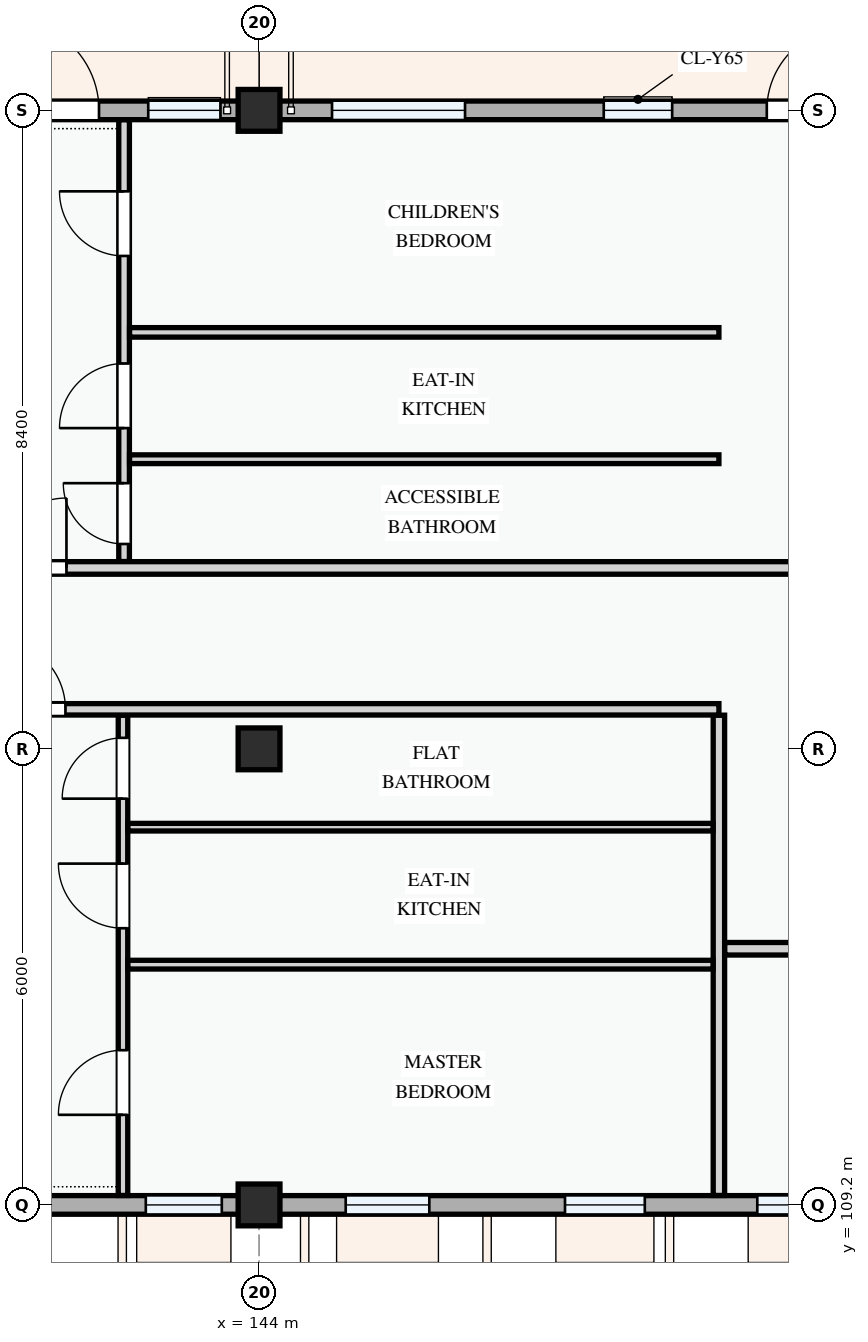
"""IFC4 building model, lengths in metres.
Left out: names, types, materials, properties, quantities, classifications, styles, units other than length and angle.
Written with IfcOpenShell. Run it as: python <this file> out.ifc"""

import sys

from ifc_helpers import new_model, si_unit, direction, frame, frame_2d, origin, origin_2d, place, context, subcontext, project, spatial, rectangle, extrude, element, fill, save


model = new_model("IFC4")
c1 = context("Model", 3, precision=1e-05, world=origin(), true_north=direction((0.0, 1.0)))
c2 = subcontext(c1, "Body", "Model", "MODEL_VIEW")
j1 = project(units=[si_unit("LENGTHUNIT", "METRE"), si_unit("PLANEANGLEUNIT", "RADIAN")], contexts=[c1])
p1 = place(None, origin())
s1 = spatial("IfcSite", under=j1, at=p1, CompositionType="ELEMENT")
p2 = place(p1, origin())
s2 = spatial("IfcBuilding", under=s1, at=p2, CompositionType="ELEMENT")
p3 = place(p2, frame((0.0, 0.0, 37.8)))
s3 = spatial("IfcBuildingStorey", under=s2, at=p3, CompositionType="ELEMENT", Elevation=37.8)
for number, where, z_axis, x_axis in (
    (1, (144.0, 109.2, 0.0), (0.0, 0.0, 1.0), (1.0, 0.0, 0.0)),
    (2, (144.0, 115.2, 0.0), (0.0, 0.0, 1.0), (1.0, 0.0, 0.0)),
    (3, (144.0, 123.6, 0.0), (0.0, 0.0, 1.0), (1.0, 0.0, 0.0)),
):
    element("IfcColumn", number, at=place(p3, frame(where, z_axis=z_axis, x_axis=x_axis)), inside=s3, PredefinedType="COLUMN", context=c2, shape_type="SweptSolid", body=[
        extrude(rectangle(XDim=0.55, YDim=0.55, at=origin_2d()), origin(), (0.0, 0.0, 1.0), 3.3),
    ])
p4 = place(p3, frame((152.4, 123.6, 0.0), z_axis=(0.0, 0.0, 1.0), x_axis=(-1.0, 0.0, 0.0)))
e4 = element("IfcWall", 4, at=p4, inside=s3, PredefinedType="STANDARD", context=c2, shape_type="SweptSolid", body=[
    extrude(rectangle(XDim=8.4, YDim=0.245, at=frame_2d((4.2, 0.0))), origin(), (0.0, 0.0, 1.0), 2.375),
])
p5 = place(p4, frame((0.62, 0.0, 0.0)))
e5 = element("IfcOpeningElement", 5, at=p5, cuts=e4, PredefinedType="OPENING", context=c2, shape_type="SweptSolid", body=[
    extrude(rectangle(XDim=1.1, YDim=2.15, at=frame_2d((0.55, 1.075))), frame((0.0, 0.133, 0.0), z_axis=(0.0, -1.0, 0.0), x_axis=(1.0, 0.0, 0.0)), (0.0, 0.0, 1.0), 0.265),
])
p6 = place(p4, frame((2.965, 0.0, 0.78)))
e6 = element("IfcOpeningElement", 6, at=p6, cuts=e4, PredefinedType="OPENING", context=c2, shape_type="SweptSolid", body=[
    extrude(rectangle(XDim=0.9, YDim=1.2, at=frame_2d((0.45, 0.6))), frame((0.0, 0.133, 0.0), z_axis=(0.0, -1.0, 0.0), x_axis=(1.0, 0.0, 0.0)), (0.0, 0.0, 1.0), 0.265),
])
p7 = place(p4, frame((5.69, 0.0, 0.78)))
e7 = element("IfcOpeningElement", 7, at=p7, cuts=e4, PredefinedType="OPENING", context=c2, shape_type="SweptSolid", body=[
    extrude(rectangle(XDim=1.75, YDim=1.45, at=frame_2d((0.875, 0.725))), frame((0.0, 0.133, 0.0), z_axis=(0.0, -1.0, 0.0), x_axis=(1.0, 0.0, 0.0)), (0.0, 0.0, 1.0), 0.265),
])
p8 = place(p3, frame((144.0, 123.6, 0.0), z_axis=(0.0, 0.0, 1.0), x_axis=(-1.0, 0.0, 0.0)))
e8 = element("IfcWall", 8, at=p8, inside=s3, PredefinedType="STANDARD", context=c2, shape_type="SweptSolid", body=[
    extrude(rectangle(XDim=6.0, YDim=0.245, at=frame_2d((3.0, 0.0))), origin(), (0.0, 0.0, 1.0), 2.525),
])
p9 = place(p8, frame((2.106, 0.0, 0.0)))
e9 = element("IfcOpeningElement", 9, at=p9, cuts=e8, PredefinedType="OPENING", context=c2, shape_type="SweptSolid", body=[
    extrude(rectangle(XDim=1.2, YDim=2.15, at=frame_2d((0.6, 1.075))), frame((0.0, 0.133, 0.0), z_axis=(0.0, -1.0, 0.0), x_axis=(1.0, 0.0, 0.0)), (0.0, 0.0, 1.0), 0.265),
])
p10 = place(p8, frame((0.508, 0.0, 0.78)))
e10 = element("IfcOpeningElement", 10, at=p10, cuts=e8, PredefinedType="OPENING", context=c2, shape_type="SweptSolid", body=[
    extrude(rectangle(XDim=0.95, YDim=1.15, at=frame_2d((0.475, 0.575))), frame((0.0, 0.133, 0.0), z_axis=(0.0, -1.0, 0.0), x_axis=(1.0, 0.0, 0.0)), (0.0, 0.0, 1.0), 0.265),
])
p11 = place(p8, frame((3.643, 0.0, 0.78)))
e11 = element("IfcOpeningElement", 11, at=p11, cuts=e8, PredefinedType="OPENING", context=c2, shape_type="SweptSolid", body=[
    extrude(rectangle(XDim=1.88, YDim=1.52, at=frame_2d((0.94, 0.76))), frame((0.0, 0.133, 0.0), z_axis=(0.0, -1.0, 0.0), x_axis=(1.0, 0.0, 0.0)), (0.0, 0.0, 1.0), 0.265),
])
p12 = place(p3, frame((138.0, 109.2, 0.0), z_axis=(0.0, 0.0, 1.0), x_axis=(1.0, 0.0, 0.0)))
e12 = element("IfcWall", 12, at=p12, inside=s3, PredefinedType="STANDARD", context=c2, shape_type="SweptSolid", body=[
    extrude(rectangle(XDim=6.0, YDim=0.245, at=frame_2d((3.0, 0.0))), origin(), (0.0, 0.0, 1.0), 2.525),
])
p13 = place(p12, frame((1.7, 0.0, 0.78)))
e13 = element("IfcOpeningElement", 13, at=p13, cuts=e12, PredefinedType="OPENING", context=c2, shape_type="SweptSolid", body=[
    extrude(rectangle(XDim=1.0, YDim=1.25, at=frame_2d((0.5, 0.625))), frame((0.0, 0.133, 0.0), z_axis=(0.0, -1.0, 0.0), x_axis=(1.0, 0.0, 0.0)), (0.0, 0.0, 1.0), 0.265),
])
p14 = place(p12, frame((4.51, 0.0, 0.78)))
e14 = element("IfcOpeningElement", 14, at=p14, cuts=e12, PredefinedType="OPENING", context=c2, shape_type="SweptSolid", body=[
    extrude(rectangle(XDim=1.0, YDim=1.25, at=frame_2d((0.5, 0.625))), frame((0.0, 0.133, 0.0), z_axis=(0.0, -1.0, 0.0), x_axis=(1.0, 0.0, 0.0)), (0.0, 0.0, 1.0), 0.265),
])
p15 = place(p3, frame((144.0, 109.2, 0.0), z_axis=(0.0, 0.0, 1.0), x_axis=(1.0, 0.0, 0.0)))
e15 = element("IfcWall", 15, at=p15, inside=s3, PredefinedType="STANDARD", context=c2, shape_type="SweptSolid", body=[
    extrude(rectangle(XDim=8.4, YDim=0.245, at=frame_2d((4.2, 0.0))), origin(), (0.0, 0.0, 1.0), 2.375),
])
p16 = place(p15, frame((1.14, 0.0, 0.78)))
e16 = element("IfcOpeningElement", 16, at=p16, cuts=e15, PredefinedType="OPENING", context=c2, shape_type="SweptSolid", body=[
    extrude(rectangle(XDim=1.1, YDim=1.3, at=frame_2d((0.55, 0.65))), frame((0.0, 0.133, 0.0), z_axis=(0.0, -1.0, 0.0), x_axis=(1.0, 0.0, 0.0)), (0.0, 0.0, 1.0), 0.265),
])
p17 = place(p15, frame((4.025, 0.0, 0.78)))
e17 = element("IfcOpeningElement", 17, at=p17, cuts=e15, PredefinedType="OPENING", context=c2, shape_type="SweptSolid", body=[
    extrude(rectangle(XDim=1.05, YDim=1.2, at=frame_2d((0.525, 0.6))), frame((0.0, 0.133, 0.0), z_axis=(0.0, -1.0, 0.0), x_axis=(1.0, 0.0, 0.0)), (0.0, 0.0, 1.0), 0.265),
])
p18 = place(p15, frame((6.555, 0.0, 0.78)))
e18 = element("IfcOpeningElement", 18, at=p18, cuts=e15, PredefinedType="OPENING", context=c2, shape_type="SweptSolid", body=[
    extrude(rectangle(XDim=1.15, YDim=1.25, at=frame_2d((0.575, 0.625))), frame((0.0, 0.133, 0.0), z_axis=(0.0, -1.0, 0.0), x_axis=(1.0, 0.0, 0.0)), (0.0, 0.0, 1.0), 0.265),
])
p19 = place(p3, frame((150.05, 109.324, 0.0), z_axis=(0.0, 0.0, 1.0), x_axis=(0.0, 1.0, 0.0)))
e19 = element("IfcWall", 19, at=p19, inside=s3, PredefinedType="PARTITIONING", context=c2, shape_type="SweptSolid", body=[
    extrude(rectangle(XDim=6.319, YDim=0.15, at=frame_2d((3.159, 0.0))), origin(), (0.0, 0.0, 1.0), 3.0),
])
p20 = place(p3, frame((150.127, 112.57, 0.0), z_axis=(0.0, 0.0, 1.0), x_axis=(1.0, 0.0, 0.0)))
e20 = element("IfcWall", 20, at=p20, inside=s3, PredefinedType="PARTITIONING", context=c2, shape_type="SweptSolid", body=[
    extrude(rectangle(XDim=2.413, YDim=0.165, at=frame_2d((1.207, 0.0))), origin(), (0.0, 0.0, 1.0), 3.0),
])
p21 = place(p3, frame((142.21, 109.324, 0.0), z_axis=(0.0, 0.0, 1.0), x_axis=(0.0, 1.0, 0.0)))
e21 = element("IfcWall", 21, at=p21, inside=s3, PredefinedType="PARTITIONING", context=c2, shape_type="SweptSolid", body=[
    extrude(rectangle(XDim=6.319, YDim=0.125, at=frame_2d((3.159, 0.0))), origin(), (0.0, 0.0, 1.0), 3.0),
])
p22 = place(p21, frame((1.061, 0.0, 0.0)))
e22 = element("IfcOpeningElement", 22, at=p22, cuts=e21, PredefinedType="OPENING", context=c2, shape_type="SweptSolid", body=[
    extrude(rectangle(XDim=0.85, YDim=2.1, at=frame_2d((0.425, 1.05))), frame((0.0, 0.073, 0.0), z_axis=(0.0, -1.0, 0.0), x_axis=(1.0, 0.0, 0.0)), (0.0, 0.0, 1.0), 0.145),
])
p23 = place(p21, frame((3.516, 0.0, 0.0)))
e23 = element("IfcOpeningElement", 23, at=p23, cuts=e21, PredefinedType="OPENING", context=c2, shape_type="SweptSolid", body=[
    extrude(rectangle(XDim=0.85, YDim=2.1, at=frame_2d((0.425, 1.05))), frame((0.0, 0.073, 0.0), z_axis=(0.0, -1.0, 0.0), x_axis=(1.0, 0.0, 0.0)), (0.0, 0.0, 1.0), 0.145),
])
p24 = place(p21, frame((5.22, 0.0, 0.0)))
e24 = element("IfcOpeningElement", 24, at=p24, cuts=e21, PredefinedType="OPENING", context=c2, shape_type="SweptSolid", body=[
    extrude(rectangle(XDim=0.8, YDim=2.1, at=frame_2d((0.4, 1.05))), frame((0.0, 0.073, 0.0), z_axis=(0.0, -1.0, 0.0), x_axis=(1.0, 0.0, 0.0)), (0.0, 0.0, 1.0), 0.145),
])
p25 = place(p3, frame((142.274, 112.361, 0.0), z_axis=(0.0, 0.0, 1.0), x_axis=(1.0, 0.0, 0.0)))
e25 = element("IfcWall", 25, at=p25, inside=s3, PredefinedType="PARTITIONING", context=c2, shape_type="SweptSolid", body=[
    extrude(rectangle(XDim=7.698, YDim=0.115, at=frame_2d((3.849, 0.0))), origin(), (0.0, 0.0, 1.0), 3.0),
])
p26 = place(p3, frame((142.274, 114.17, 0.0), z_axis=(0.0, 0.0, 1.0), x_axis=(1.0, 0.0, 0.0)))
e26 = element("IfcWall", 26, at=p26, inside=s3, PredefinedType="PARTITIONING", context=c2, shape_type="SweptSolid", body=[
    extrude(rectangle(XDim=7.698, YDim=0.1, at=frame_2d((3.849, 0.0))), origin(), (0.0, 0.0, 1.0), 3.0),
])
p27 = place(p3, frame((142.224, 117.665, 0.0), z_axis=(0.0, 0.0, 1.0), x_axis=(0.0, 1.0, 0.0)))
e27 = element("IfcWall", 27, at=p27, inside=s3, PredefinedType="PARTITIONING", context=c2, shape_type="SweptSolid", body=[
    extrude(rectangle(XDim=5.811, YDim=0.14, at=frame_2d((2.906, 0.0))), origin(), (0.0, 0.0, 1.0), 3.0),
])
p28 = place(p27, frame((0.231, 0.0, 0.0)))
e28 = element("IfcOpeningElement", 28, at=p28, cuts=e27, PredefinedType="OPENING", context=c2, shape_type="SweptSolid", body=[
    extrude(rectangle(XDim=0.8, YDim=2.1, at=frame_2d((0.4, 1.05))), frame((0.0, 0.08, 0.0), z_axis=(0.0, -1.0, 0.0), x_axis=(1.0, 0.0, 0.0)), (0.0, 0.0, 1.0), 0.16),
])
p29 = place(p27, frame((1.755, 0.0, 0.0)))
e29 = element("IfcOpeningElement", 29, at=p29, cuts=e27, PredefinedType="OPENING", context=c2, shape_type="SweptSolid", body=[
    extrude(rectangle(XDim=0.85, YDim=2.1, at=frame_2d((0.425, 1.05))), frame((0.0, 0.08, 0.0), z_axis=(0.0, -1.0, 0.0), x_axis=(1.0, 0.0, 0.0)), (0.0, 0.0, 1.0), 0.16),
])
p30 = place(p27, frame((4.02, 0.0, 0.0)))
e30 = element("IfcOpeningElement", 30, at=p30, cuts=e27, PredefinedType="OPENING", context=c2, shape_type="SweptSolid", body=[
    extrude(rectangle(XDim=0.85, YDim=2.1, at=frame_2d((0.425, 1.05))), frame((0.0, 0.08, 0.0), z_axis=(0.0, -1.0, 0.0), x_axis=(1.0, 0.0, 0.0)), (0.0, 0.0, 1.0), 0.16),
])
p31 = place(p3, frame((142.296, 120.679, 0.0), z_axis=(0.0, 0.0, 1.0), x_axis=(1.0, 0.0, 0.0)))
e31 = element("IfcWall", 31, at=p31, inside=s3, PredefinedType="PARTITIONING", context=c2, shape_type="SweptSolid", body=[
    extrude(rectangle(XDim=7.754, YDim=0.125, at=frame_2d((3.877, 0.0))), origin(), (0.0, 0.0, 1.0), 3.0),
])
p32 = place(p3, frame((142.296, 119.01, 0.0), z_axis=(0.0, 0.0, 1.0), x_axis=(1.0, 0.0, 0.0)))
e32 = element("IfcWall", 32, at=p32, inside=s3, PredefinedType="PARTITIONING", context=c2, shape_type="SweptSolid", body=[
    extrude(rectangle(XDim=7.754, YDim=0.115, at=frame_2d((3.877, 0.0))), origin(), (0.0, 0.0, 1.0), 3.0),
])
p33 = place(p3, frame((109.324, 115.72, 0.0), z_axis=(0.0, 0.0, 1.0), x_axis=(1.0, 0.0, 0.0)))
e33 = element("IfcWall", 33, at=p33, inside=s3, PredefinedType="PARTITIONING", context=c2, shape_type="SweptSolid", body=[
    extrude(rectangle(XDim=40.726, YDim=0.15, at=frame_2d((20.363, 0.0))), origin(), (0.0, 0.0, 1.0), 3.0),
])
p34 = place(p33, frame((2.322, 0.0, 0.0)))
e34 = element("IfcOpeningElement", 34, at=p34, cuts=e33, PredefinedType="OPENING", context=c2, shape_type="SweptSolid", body=[
    extrude(rectangle(XDim=0.92, YDim=2.1, at=frame_2d((0.46, 1.05))), frame((0.0, 0.085, 0.0), z_axis=(0.0, -1.0, 0.0), x_axis=(1.0, 0.0, 0.0)), (0.0, 0.0, 1.0), 0.17),
])
p35 = place(p33, frame((16.832, 0.0, 0.0)))
e35 = element("IfcOpeningElement", 35, at=p35, cuts=e33, PredefinedType="OPENING", context=c2, shape_type="SweptSolid", body=[
    extrude(rectangle(XDim=0.92, YDim=2.1, at=frame_2d((0.46, 1.05))), frame((0.0, 0.085, 0.0), z_axis=(0.0, -1.0, 0.0), x_axis=(1.0, 0.0, 0.0)), (0.0, 0.0, 1.0), 0.17),
])
p36 = place(p33, frame((31.208, 0.0, 0.0)))
e36 = element("IfcOpeningElement", 36, at=p36, cuts=e33, PredefinedType="OPENING", context=c2, shape_type="SweptSolid", body=[
    extrude(rectangle(XDim=0.92, YDim=2.1, at=frame_2d((0.46, 1.05))), frame((0.0, 0.085, 0.0), z_axis=(0.0, -1.0, 0.0), x_axis=(1.0, 0.0, 0.0)), (0.0, 0.0, 1.0), 0.17),
])
p37 = place(p3, frame((109.324, 117.58, 0.0), z_axis=(0.0, 0.0, 1.0), x_axis=(1.0, 0.0, 0.0)))
e37 = element("IfcWall", 37, at=p37, inside=s3, PredefinedType="PARTITIONING", context=c2, shape_type="SweptSolid", body=[
    extrude(rectangle(XDim=43.216, YDim=0.165, at=frame_2d((21.608, 0.0))), origin(), (0.0, 0.0, 1.0), 3.0),
])
p38 = place(p37, frame((2.339, 0.0, 0.0)))
e38 = element("IfcOpeningElement", 38, at=p38, cuts=e37, PredefinedType="OPENING", context=c2, shape_type="SweptSolid", body=[
    extrude(rectangle(XDim=0.92, YDim=2.1, at=frame_2d((0.46, 1.05))), frame((0.0, 0.093, 0.0), z_axis=(0.0, -1.0, 0.0), x_axis=(1.0, 0.0, 0.0)), (0.0, 0.0, 1.0), 0.185),
])
p39 = place(p37, frame((16.851, 0.0, 0.0)))
e39 = element("IfcOpeningElement", 39, at=p39, cuts=e37, PredefinedType="OPENING", context=c2, shape_type="SweptSolid", body=[
    extrude(rectangle(XDim=0.96, YDim=2.12, at=frame_2d((0.48, 1.06))), frame((0.0, 0.093, 0.0), z_axis=(0.0, -1.0, 0.0), x_axis=(1.0, 0.0, 0.0)), (0.0, 0.0, 1.0), 0.185),
])
p40 = place(p37, frame((31.222, 0.0, 0.0)))
e40 = element("IfcOpeningElement", 40, at=p40, cuts=e37, PredefinedType="OPENING", context=c2, shape_type="SweptSolid", body=[
    extrude(rectangle(XDim=0.92, YDim=2.1, at=frame_2d((0.46, 1.05))), frame((0.0, 0.093, 0.0), z_axis=(0.0, -1.0, 0.0), x_axis=(1.0, 0.0, 0.0)), (0.0, 0.0, 1.0), 0.185),
])
p41 = place(p5, frame((1.1, 0.0, 0.0), z_axis=(0.0, 0.0, 1.0), x_axis=(-1.0, 0.0, 0.0)))
e41 = element("IfcDoor", 41, at=p41, inside=s3, OperationType="SINGLE_SWING_RIGHT", PredefinedType="DOOR", context=c2, shape_type="SweptSolid", body=[
    extrude(rectangle(XDim=1.1, YDim=2.15, at=frame_2d((0.55, 1.075))), frame((0.0, 0.025, 0.0), z_axis=(0.0, -1.0, 0.0), x_axis=(1.0, 0.0, 0.0)), (0.0, 0.0, 1.0), 0.05),
])
fill(e5, e41)
p42 = place(p6, origin())
e42 = element("IfcWindow", 42, at=p42, inside=s3, PartitioningType="SINGLE_PANEL", PredefinedType="WINDOW", context=c2, shape_type="SweptSolid", body=[
    extrude(rectangle(XDim=0.9, YDim=1.2, at=frame_2d((0.45, 0.6))), frame((0.0, 0.03, 0.0), z_axis=(0.0, -1.0, 0.0), x_axis=(1.0, 0.0, 0.0)), (0.0, 0.0, 1.0), 0.06),
])
fill(e6, e42)
p43 = place(p7, origin())
e43 = element("IfcWindow", 43, at=p43, inside=s3, PartitioningType="DOUBLE_PANEL_VERTICAL", PredefinedType="WINDOW", context=c2, shape_type="SweptSolid", body=[
    extrude(rectangle(XDim=1.75, YDim=1.45, at=frame_2d((0.875, 0.725))), frame((0.0, 0.03, 0.0), z_axis=(0.0, -1.0, 0.0), x_axis=(1.0, 0.0, 0.0)), (0.0, 0.0, 1.0), 0.06),
])
fill(e7, e43)
p44 = place(p9, frame((1.2, 0.0, 0.0), z_axis=(0.0, 0.0, 1.0), x_axis=(-1.0, 0.0, 0.0)))
e44 = element("IfcDoor", 44, at=p44, inside=s3, OperationType="SINGLE_SWING_LEFT", PredefinedType="DOOR", context=c2, shape_type="SweptSolid", body=[
    extrude(rectangle(XDim=1.2, YDim=2.15, at=frame_2d((0.6, 1.075))), frame((0.0, 0.025, 0.0), z_axis=(0.0, -1.0, 0.0), x_axis=(1.0, 0.0, 0.0)), (0.0, 0.0, 1.0), 0.05),
])
fill(e9, e44)
p45 = place(p10, origin())
e45 = element("IfcWindow", 45, at=p45, inside=s3, PartitioningType="SINGLE_PANEL", PredefinedType="WINDOW", context=c2, shape_type="SweptSolid", body=[
    extrude(rectangle(XDim=0.95, YDim=1.15, at=frame_2d((0.475, 0.575))), frame((0.0, 0.03, 0.0), z_axis=(0.0, -1.0, 0.0), x_axis=(1.0, 0.0, 0.0)), (0.0, 0.0, 1.0), 0.06),
])
fill(e10, e45)
p46 = place(p14, origin())
e46 = element("IfcWindow", 46, at=p46, inside=s3, PartitioningType="SINGLE_PANEL", PredefinedType="WINDOW", context=c2, shape_type="SweptSolid", body=[
    extrude(rectangle(XDim=1.0, YDim=1.25, at=frame_2d((0.5, 0.625))), frame((0.0, 0.03, 0.0), z_axis=(0.0, -1.0, 0.0), x_axis=(1.0, 0.0, 0.0)), (0.0, 0.0, 1.0), 0.06),
])
fill(e14, e46)
p47 = place(p16, origin())
e47 = element("IfcWindow", 47, at=p47, inside=s3, PartitioningType="SINGLE_PANEL", PredefinedType="WINDOW", context=c2, shape_type="SweptSolid", body=[
    extrude(rectangle(XDim=1.1, YDim=1.3, at=frame_2d((0.55, 0.65))), frame((0.0, 0.03, 0.0), z_axis=(0.0, -1.0, 0.0), x_axis=(1.0, 0.0, 0.0)), (0.0, 0.0, 1.0), 0.06),
])
fill(e16, e47)
p48 = place(p17, origin())
e48 = element("IfcWindow", 48, at=p48, inside=s3, PartitioningType="SINGLE_PANEL", PredefinedType="WINDOW", context=c2, shape_type="SweptSolid", body=[
    extrude(rectangle(XDim=1.05, YDim=1.2, at=frame_2d((0.525, 0.6))), frame((0.0, 0.03, 0.0), z_axis=(0.0, -1.0, 0.0), x_axis=(1.0, 0.0, 0.0)), (0.0, 0.0, 1.0), 0.06),
])
fill(e17, e48)
p49 = place(p18, origin())
e49 = element("IfcWindow", 49, at=p49, inside=s3, PartitioningType="SINGLE_PANEL", PredefinedType="WINDOW", context=c2, shape_type="SweptSolid", body=[
    extrude(rectangle(XDim=1.15, YDim=1.25, at=frame_2d((0.575, 0.625))), frame((0.0, 0.03, 0.0), z_axis=(0.0, -1.0, 0.0), x_axis=(1.0, 0.0, 0.0)), (0.0, 0.0, 1.0), 0.06),
])
fill(e18, e49)
p50 = place(p22, origin())
e50 = element("IfcDoor", 50, at=p50, inside=s3, OperationType="SINGLE_SWING_LEFT", PredefinedType="DOOR", context=c2, shape_type="SweptSolid", body=[
    extrude(rectangle(XDim=0.85, YDim=2.1, at=frame_2d((0.425, 1.05))), frame((0.0, 0.025, 0.0), z_axis=(0.0, -1.0, 0.0), x_axis=(1.0, 0.0, 0.0)), (0.0, 0.0, 1.0), 0.05),
])
fill(e22, e50)
p51 = place(p23, origin())
e51 = element("IfcDoor", 51, at=p51, inside=s3, OperationType="SINGLE_SWING_RIGHT", PredefinedType="DOOR", context=c2, shape_type="SweptSolid", body=[
    extrude(rectangle(XDim=0.85, YDim=2.1, at=frame_2d((0.425, 1.05))), frame((0.0, 0.025, 0.0), z_axis=(0.0, -1.0, 0.0), x_axis=(1.0, 0.0, 0.0)), (0.0, 0.0, 1.0), 0.05),
])
fill(e23, e51)
p52 = place(p24, origin())
e52 = element("IfcDoor", 52, at=p52, inside=s3, OperationType="SINGLE_SWING_LEFT", PredefinedType="DOOR", context=c2, shape_type="SweptSolid", body=[
    extrude(rectangle(XDim=0.8, YDim=2.1, at=frame_2d((0.4, 1.05))), frame((0.0, 0.025, 0.0), z_axis=(0.0, -1.0, 0.0), x_axis=(1.0, 0.0, 0.0)), (0.0, 0.0, 1.0), 0.05),
])
fill(e24, e52)
p53 = place(p28, origin())
e53 = element("IfcDoor", 53, at=p53, inside=s3, OperationType="SINGLE_SWING_RIGHT", PredefinedType="DOOR", context=c2, shape_type="SweptSolid", body=[
    extrude(rectangle(XDim=0.8, YDim=2.1, at=frame_2d((0.4, 1.05))), frame((0.0, 0.025, 0.0), z_axis=(0.0, -1.0, 0.0), x_axis=(1.0, 0.0, 0.0)), (0.0, 0.0, 1.0), 0.05),
])
fill(e28, e53)
p54 = place(p29, origin())
e54 = element("IfcDoor", 54, at=p54, inside=s3, OperationType="SINGLE_SWING_LEFT", PredefinedType="DOOR", context=c2, shape_type="SweptSolid", body=[
    extrude(rectangle(XDim=0.85, YDim=2.1, at=frame_2d((0.425, 1.05))), frame((0.0, 0.025, 0.0), z_axis=(0.0, -1.0, 0.0), x_axis=(1.0, 0.0, 0.0)), (0.0, 0.0, 1.0), 0.05),
])
fill(e29, e54)
p55 = place(p30, origin())
e55 = element("IfcDoor", 55, at=p55, inside=s3, OperationType="SINGLE_SWING_RIGHT", PredefinedType="DOOR", context=c2, shape_type="SweptSolid", body=[
    extrude(rectangle(XDim=0.85, YDim=2.1, at=frame_2d((0.425, 1.05))), frame((0.0, 0.025, 0.0), z_axis=(0.0, -1.0, 0.0), x_axis=(1.0, 0.0, 0.0)), (0.0, 0.0, 1.0), 0.05),
])
fill(e30, e55)
p56 = place(p36, origin())
e56 = element("IfcDoor", 56, at=p56, inside=s3, OperationType="SINGLE_SWING_LEFT", PredefinedType="DOOR", context=c2, shape_type="SweptSolid", body=[
    extrude(rectangle(XDim=0.92, YDim=2.1, at=frame_2d((0.46, 1.05))), frame((0.0, 0.025, 0.0), z_axis=(0.0, -1.0, 0.0), x_axis=(1.0, 0.0, 0.0)), (0.0, 0.0, 1.0), 0.05),
])
fill(e36, e56)
p57 = place(p40, origin())
e57 = element("IfcDoor", 57, at=p57, inside=s3, OperationType="SINGLE_SWING_RIGHT", PredefinedType="DOOR", context=c2, shape_type="SweptSolid", body=[
    extrude(rectangle(XDim=0.92, YDim=2.1, at=frame_2d((0.46, 1.05))), frame((0.0, 0.025, 0.0), z_axis=(0.0, -1.0, 0.0), x_axis=(1.0, 0.0, 0.0)), (0.0, 0.0, 1.0), 0.05),
])
fill(e40, e57)
save(model, sys.argv[1])
